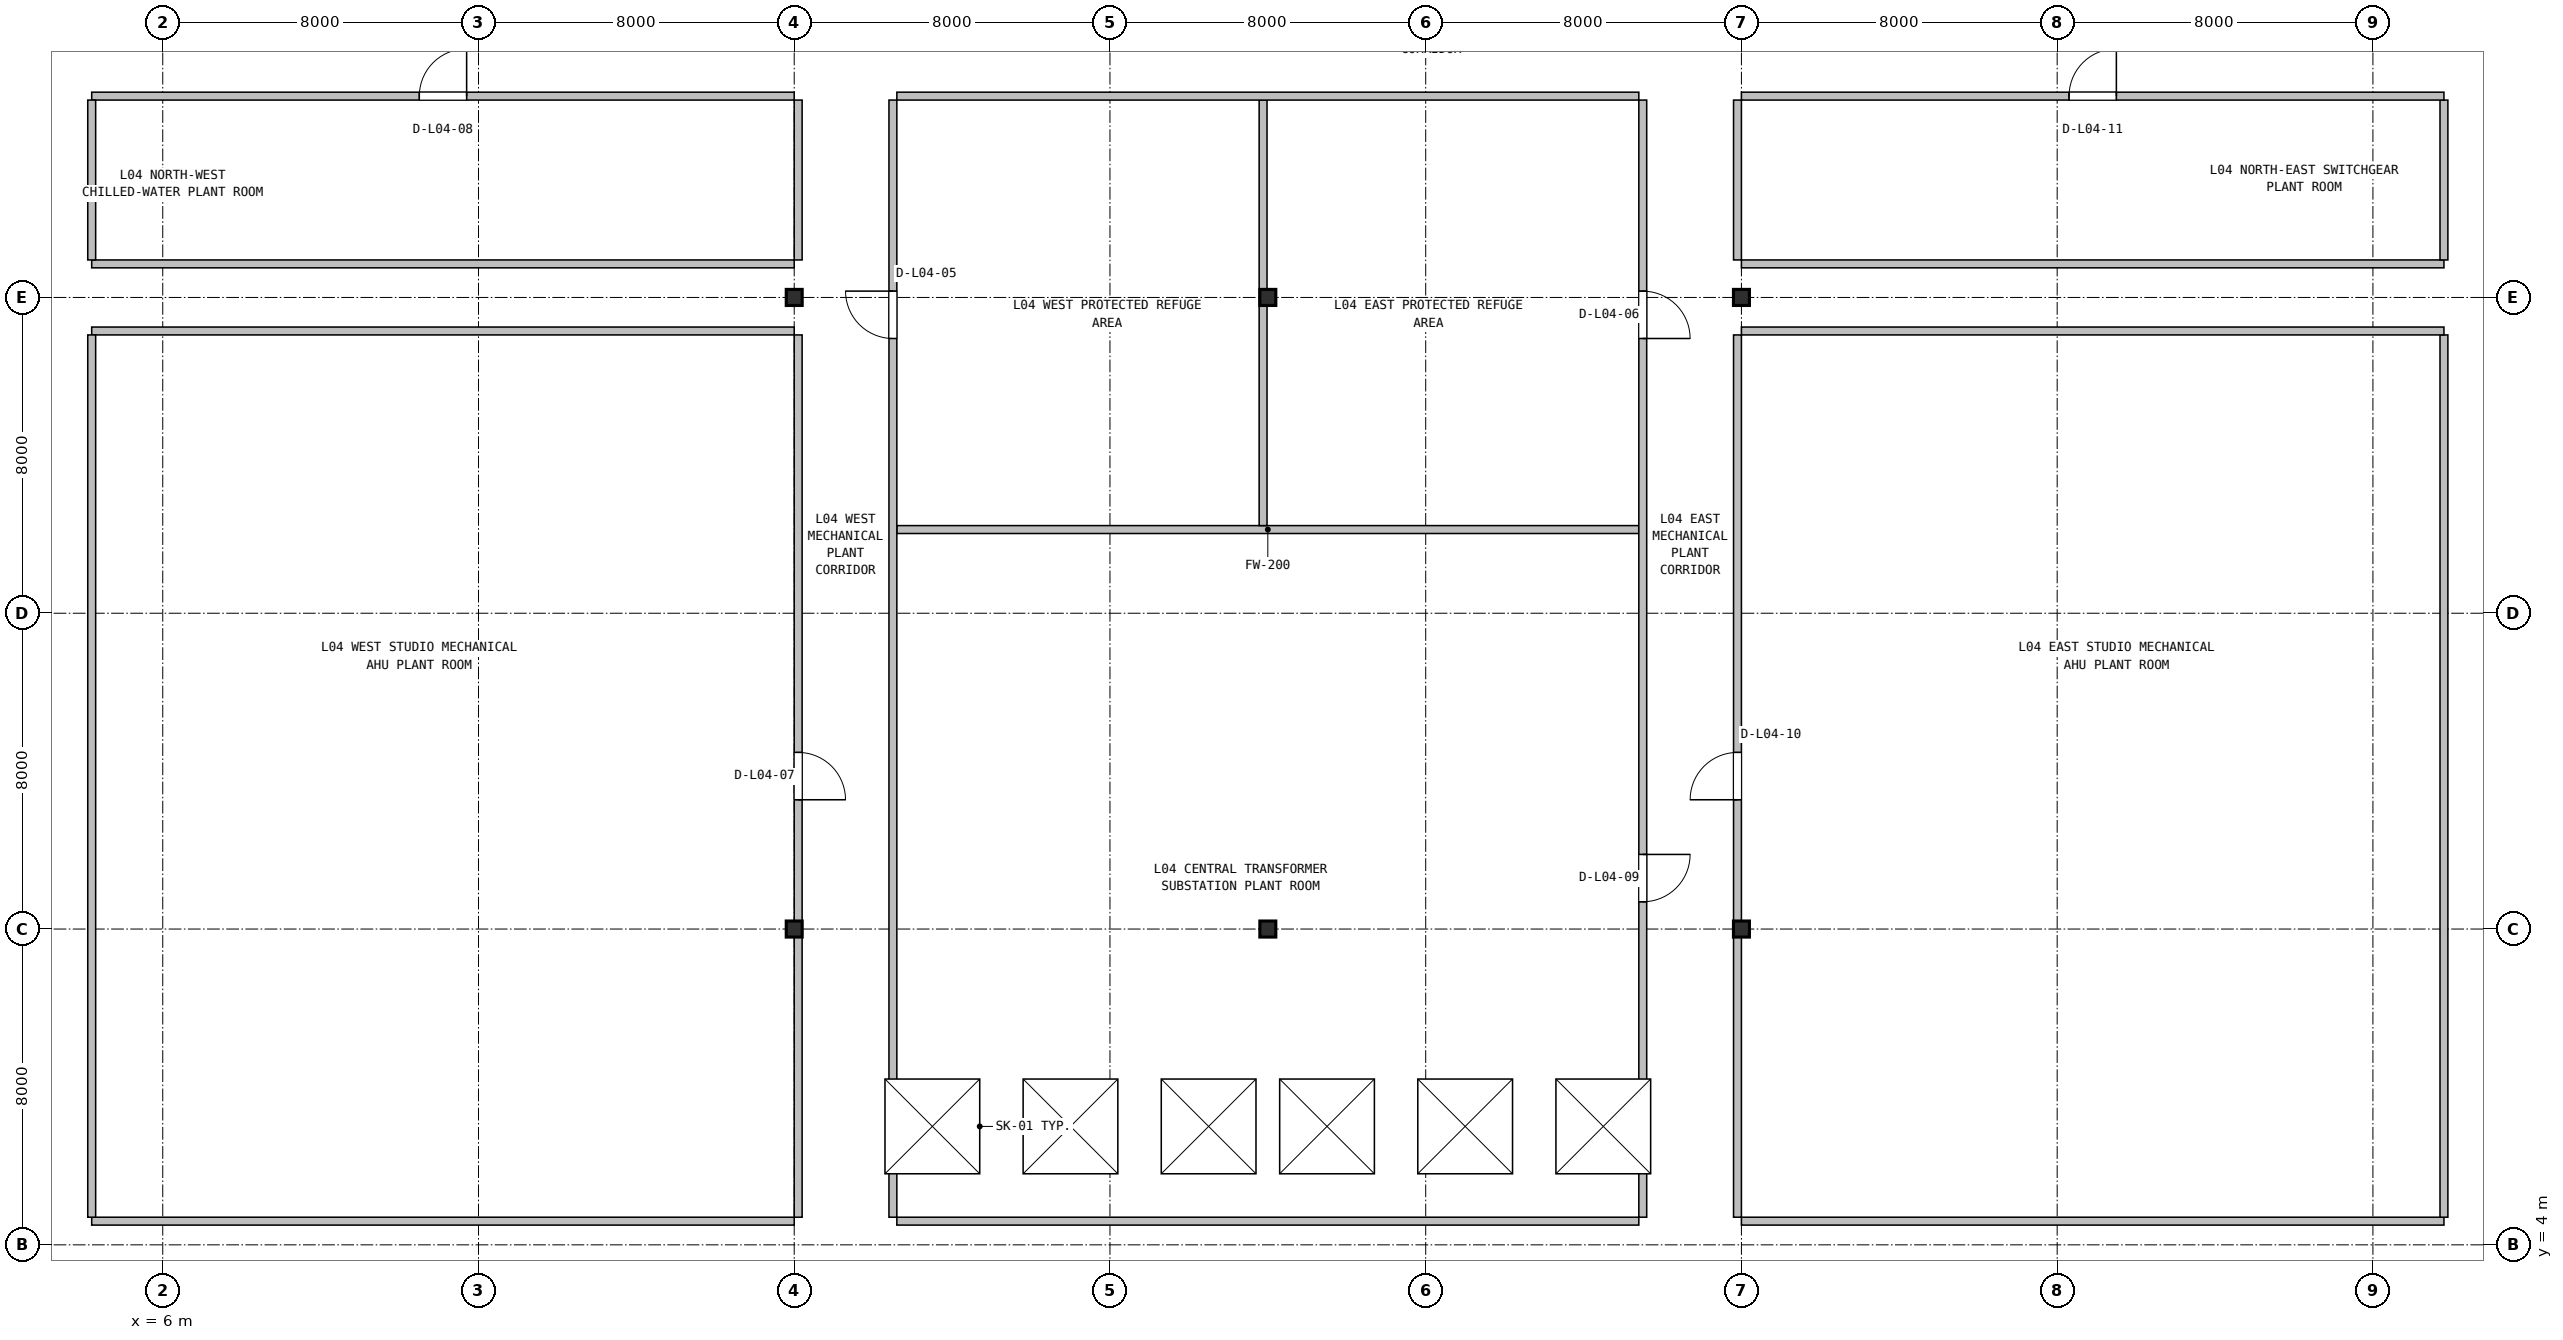
"""IFC4 building model, lengths in metres.
Left out: names, types, materials, properties, quantities, classifications, styles, units other than length and angle.
Written with IfcOpenShell. Run it as: python <this file> out.ifc"""

import sys

from ifc_helpers import new_model, si_unit, direction, frame, frame_2d, origin, origin_2d, place, context, subcontext, project, spatial, rectangle, i_section, extrude, source, transform, mapped, element, fill, save


model = new_model("IFC4")
c1 = context("Model", 3, precision=1e-05, world=origin(), true_north=direction((0.0, 1.0)))
c2 = subcontext(c1, "Body", "Model", "MODEL_VIEW")
j1 = project(units=[si_unit("LENGTHUNIT", "METRE"), si_unit("PLANEANGLEUNIT", "RADIAN")], contexts=[c1])
p1 = place(None, origin())
s1 = spatial("IfcSite", under=j1, at=p1, CompositionType="ELEMENT")
p2 = place(p1, origin())
s2 = spatial("IfcBuilding", under=s1, at=p2, CompositionType="ELEMENT")
p3 = place(p2, frame((0.0, 0.0, 22.2)))
s3 = spatial("IfcBuildingStorey", under=s2, at=p3, CompositionType="ELEMENT", Elevation=22.2)
m1 = source(origin(), c2, "Body", "SweptSolid", [
    extrude(i_section(OverallWidth=0.404, OverallDepth=0.407, WebThickness=0.027, FlangeThickness=0.044, FilletRadius=0.018, at=origin_2d()), origin(), (0.0, 0.0, 1.0), 5.4),
])
for number, where, z_axis, x_axis in (
    (1, (22.0, 12.0, 0.0), (0.0, 0.0, 1.0), (1.0, 0.0, 0.0)),
    (2, (34.0, 12.0, 0.0), (0.0, 0.0, 1.0), (1.0, 0.0, 0.0)),
    (3, (46.0, 12.0, 0.0), (0.0, 0.0, 1.0), (1.0, 0.0, 0.0)),
    (4, (22.0, 28.0, 0.0), (0.0, 0.0, 1.0), (1.0, 0.0, 0.0)),
    (5, (34.0, 28.0, 0.0), (0.0, 0.0, 1.0), (1.0, 0.0, 0.0)),
    (6, (46.0, 28.0, 0.0), (0.0, 0.0, 1.0), (1.0, 0.0, 0.0)),
):
    element("IfcColumn", number, at=place(p3, frame(where, z_axis=z_axis, x_axis=x_axis)), inside=s3, PredefinedType="COLUMN", context=c2, shape_type="MappedRepresentation", body=[
        mapped(m1, transform((0.0, 0.0, 0.0), x_axis=(1.0, 0.0, 0.0), y_axis=(0.0, 1.0, 0.0), z_axis=(0.0, 0.0, 1.0), scale=1.0)),
    ])
p4 = place(p3, frame((24.6, 22.12, 0.0), z_axis=(0.0, 0.0, 1.0), x_axis=(1.0, 0.0, 0.0)))
e7 = element("IfcWall", 7, at=p4, inside=s3, PredefinedType="SOLIDWALL", context=c2, shape_type="SweptSolid", body=[
    extrude(rectangle(XDim=18.8, YDim=0.2, at=frame_2d((9.4, 0.0))), origin(), (0.0, 0.0, 1.0), 3.725),
])
p5 = place(p3, frame((33.88, 22.22, 0.0), z_axis=(0.0, 0.0, 1.0), x_axis=(0.0, 1.0, 0.0)))
e8 = element("IfcWall", 8, at=p5, inside=s3, PredefinedType="SOLIDWALL", context=c2, shape_type="SweptSolid", body=[
    extrude(rectangle(XDim=10.78, YDim=0.2, at=frame_2d((5.39, 0.0))), origin(), (0.0, 0.0, 1.0), 3.725),
])
p6 = place(p3, frame((24.6, 33.1, 0.0), z_axis=(0.0, 0.0, 1.0), x_axis=(1.0, 0.0, 0.0)))
e9 = element("IfcWall", 9, at=p6, inside=s3, PredefinedType="SOLIDWALL", context=c2, shape_type="SweptSolid", body=[
    extrude(rectangle(XDim=18.8, YDim=0.2, at=frame_2d((9.4, 0.0))), origin(), (0.0, 0.0, 1.0), 3.855),
])
p7 = place(p3, frame((24.5, 4.7, 0.0), z_axis=(0.0, 0.0, 1.0), x_axis=(0.0, 1.0, 0.0)))
e10 = element("IfcWall", 10, at=p7, inside=s3, PredefinedType="SOLIDWALL", context=c2, shape_type="SweptSolid", body=[
    extrude(rectangle(XDim=28.3, YDim=0.2, at=frame_2d((14.15, 0.0))), origin(), (0.0, 0.0, 1.0), 3.725),
])
p8 = place(p7, frame((22.26, 0.0, 0.0)))
e11 = element("IfcOpeningElement", 11, at=p8, cuts=e10, PredefinedType="OPENING", context=c2, shape_type="SweptSolid", body=[
    extrude(rectangle(XDim=1.2, YDim=2.1, at=frame_2d((0.6, 1.05))), frame((0.0, 0.11, 0.0), z_axis=(0.0, -1.0, 0.0), x_axis=(1.0, 0.0, 0.0)), (0.0, 0.0, 1.0), 0.22),
])
p9 = place(p3, frame((43.5, 4.7, 0.0), z_axis=(0.0, 0.0, 1.0), x_axis=(0.0, 1.0, 0.0)))
e12 = element("IfcWall", 12, at=p9, inside=s3, PredefinedType="SOLIDWALL", context=c2, shape_type="SweptSolid", body=[
    extrude(rectangle(XDim=28.3, YDim=0.2, at=frame_2d((14.15, 0.0))), origin(), (0.0, 0.0, 1.0), 3.725),
])
p10 = place(p9, frame((22.26, 0.0, 0.0)))
e13 = element("IfcOpeningElement", 13, at=p10, cuts=e12, PredefinedType="OPENING", context=c2, shape_type="SweptSolid", body=[
    extrude(rectangle(XDim=1.2, YDim=2.1, at=frame_2d((0.6, 1.05))), frame((0.0, 0.11, 0.0), z_axis=(0.0, -1.0, 0.0), x_axis=(1.0, 0.0, 0.0)), (0.0, 0.0, 1.0), 0.22),
])
p11 = place(p9, frame((7.99, 0.0, 0.0)))
e14 = element("IfcOpeningElement", 14, at=p11, cuts=e12, PredefinedType="OPENING", context=c2, shape_type="SweptSolid", body=[
    extrude(rectangle(XDim=1.2, YDim=2.1, at=frame_2d((0.6, 1.05))), frame((0.0, 0.11, 0.0), z_axis=(0.0, -1.0, 0.0), x_axis=(1.0, 0.0, 0.0)), (0.0, 0.0, 1.0), 0.22),
])
p12 = place(p3, frame((4.2, 4.6, 0.0), z_axis=(0.0, 0.0, 1.0), x_axis=(1.0, 0.0, 0.0)))
e15 = element("IfcWall", 15, at=p12, inside=s3, PredefinedType="SOLIDWALL", context=c2, shape_type="SweptSolid", body=[
    extrude(rectangle(XDim=17.8, YDim=0.2, at=frame_2d((8.9, 0.0))), origin(), (0.0, 0.0, 1.0), 3.725),
])
p13 = place(p3, frame((22.1, 4.7, 0.0), z_axis=(0.0, 0.0, 1.0), x_axis=(0.0, 1.0, 0.0)))
e16 = element("IfcWall", 16, at=p13, inside=s3, PredefinedType="SOLIDWALL", context=c2, shape_type="SweptSolid", body=[
    extrude(rectangle(XDim=22.35, YDim=0.2, at=frame_2d((11.175, 0.0))), origin(), (0.0, 0.0, 1.0), 3.725),
])
p14 = place(p13, frame((10.575, 0.0, 0.0)))
e17 = element("IfcOpeningElement", 17, at=p14, cuts=e16, PredefinedType="OPENING", context=c2, shape_type="SweptSolid", body=[
    extrude(rectangle(XDim=1.2, YDim=2.1, at=frame_2d((0.6, 1.05))), frame((0.0, 0.11, 0.0), z_axis=(0.0, -1.0, 0.0), x_axis=(1.0, 0.0, 0.0)), (0.0, 0.0, 1.0), 0.22),
])
p15 = place(p3, frame((4.2, 27.15, 0.0), z_axis=(0.0, 0.0, 1.0), x_axis=(1.0, 0.0, 0.0)))
e18 = element("IfcWall", 18, at=p15, inside=s3, PredefinedType="SOLIDWALL", context=c2, shape_type="SweptSolid", body=[
    extrude(rectangle(XDim=17.8, YDim=0.2, at=frame_2d((8.9, 0.0))), origin(), (0.0, 0.0, 1.0), 3.725),
])
p16 = place(p3, frame((4.2, 4.7, 0.0), z_axis=(0.0, 0.0, 1.0), x_axis=(0.0, 1.0, 0.0)))
e19 = element("IfcWall", 19, at=p16, inside=s3, PredefinedType="SOLIDWALL", context=c2, shape_type="SweptSolid", body=[
    extrude(rectangle(XDim=22.35, YDim=0.2, at=frame_2d((11.175, 0.0))), origin(), (0.0, 0.0, 1.0), 3.725),
])
p17 = place(p3, frame((4.2, 28.85, 0.0), z_axis=(0.0, 0.0, 1.0), x_axis=(1.0, 0.0, 0.0)))
e20 = element("IfcWall", 20, at=p17, inside=s3, PredefinedType="SOLIDWALL", context=c2, shape_type="SweptSolid", body=[
    extrude(rectangle(XDim=17.8, YDim=0.2, at=frame_2d((8.9, 0.0))), origin(), (0.0, 0.0, 1.0), 5.06),
])
p18 = place(p3, frame((22.1, 28.95, 0.0), z_axis=(0.0, 0.0, 1.0), x_axis=(0.0, 1.0, 0.0)))
e21 = element("IfcWall", 21, at=p18, inside=s3, PredefinedType="SOLIDWALL", context=c2, shape_type="SweptSolid", body=[
    extrude(rectangle(XDim=4.05, YDim=0.2, at=frame_2d((2.025, 0.0))), origin(), (0.0, 0.0, 1.0), 3.855),
])
p19 = place(p3, frame((4.2, 33.1, 0.0), z_axis=(0.0, 0.0, 1.0), x_axis=(1.0, 0.0, 0.0)))
e22 = element("IfcWall", 22, at=p19, inside=s3, PredefinedType="SOLIDWALL", context=c2, shape_type="SweptSolid", body=[
    extrude(rectangle(XDim=17.8, YDim=0.2, at=frame_2d((8.9, 0.0))), origin(), (0.0, 0.0, 1.0), 5.06),
])
p20 = place(p19, frame((8.3, 0.0, 0.0)))
e23 = element("IfcOpeningElement", 23, at=p20, cuts=e22, PredefinedType="OPENING", context=c2, shape_type="SweptSolid", body=[
    extrude(rectangle(XDim=1.2, YDim=2.1, at=frame_2d((0.6, 1.05))), frame((0.0, 0.11, 0.0), z_axis=(0.0, -1.0, 0.0), x_axis=(1.0, 0.0, 0.0)), (0.0, 0.0, 1.0), 0.22),
])
p21 = place(p3, frame((4.2, 28.95, 0.0), z_axis=(0.0, 0.0, 1.0), x_axis=(0.0, 1.0, 0.0)))
e24 = element("IfcWall", 24, at=p21, inside=s3, PredefinedType="SOLIDWALL", context=c2, shape_type="SweptSolid", body=[
    extrude(rectangle(XDim=4.05, YDim=0.2, at=frame_2d((2.025, 0.0))), origin(), (0.0, 0.0, 1.0), 5.06),
])
p22 = place(p3, frame((24.6, 4.6, 0.0), z_axis=(0.0, 0.0, 1.0), x_axis=(1.0, 0.0, 0.0)))
e25 = element("IfcWall", 25, at=p22, inside=s3, PredefinedType="SOLIDWALL", context=c2, shape_type="SweptSolid", body=[
    extrude(rectangle(XDim=18.8, YDim=0.2, at=frame_2d((9.4, 0.0))), origin(), (0.0, 0.0, 1.0), 3.725),
])
p23 = place(p3, frame((46.0, 4.6, 0.0), z_axis=(0.0, 0.0, 1.0), x_axis=(1.0, 0.0, 0.0)))
e26 = element("IfcWall", 26, at=p23, inside=s3, PredefinedType="SOLIDWALL", context=c2, shape_type="SweptSolid", body=[
    extrude(rectangle(XDim=17.8, YDim=0.2, at=frame_2d((8.9, 0.0))), origin(), (0.0, 0.0, 1.0), 3.725),
])
p24 = place(p3, frame((63.8, 4.7, 0.0), z_axis=(0.0, 0.0, 1.0), x_axis=(0.0, 1.0, 0.0)))
e27 = element("IfcWall", 27, at=p24, inside=s3, PredefinedType="SOLIDWALL", context=c2, shape_type="SweptSolid", body=[
    extrude(rectangle(XDim=22.35, YDim=0.2, at=frame_2d((11.175, 0.0))), origin(), (0.0, 0.0, 1.0), 3.725),
])
p25 = place(p3, frame((46.0, 27.15, 0.0), z_axis=(0.0, 0.0, 1.0), x_axis=(1.0, 0.0, 0.0)))
e28 = element("IfcWall", 28, at=p25, inside=s3, PredefinedType="SOLIDWALL", context=c2, shape_type="SweptSolid", body=[
    extrude(rectangle(XDim=17.8, YDim=0.2, at=frame_2d((8.9, 0.0))), origin(), (0.0, 0.0, 1.0), 3.725),
])
p26 = place(p3, frame((45.9, 4.7, 0.0), z_axis=(0.0, 0.0, 1.0), x_axis=(0.0, 1.0, 0.0)))
e29 = element("IfcWall", 29, at=p26, inside=s3, PredefinedType="SOLIDWALL", context=c2, shape_type="SweptSolid", body=[
    extrude(rectangle(XDim=22.35, YDim=0.2, at=frame_2d((11.175, 0.0))), origin(), (0.0, 0.0, 1.0), 3.725),
])
p27 = place(p26, frame((10.575, 0.0, 0.0)))
e30 = element("IfcOpeningElement", 30, at=p27, cuts=e29, PredefinedType="OPENING", context=c2, shape_type="SweptSolid", body=[
    extrude(rectangle(XDim=1.2, YDim=2.1, at=frame_2d((0.6, 1.05))), frame((0.0, 0.11, 0.0), z_axis=(0.0, -1.0, 0.0), x_axis=(1.0, 0.0, 0.0)), (0.0, 0.0, 1.0), 0.22),
])
p28 = place(p3, frame((46.0, 28.85, 0.0), z_axis=(0.0, 0.0, 1.0), x_axis=(1.0, 0.0, 0.0)))
e31 = element("IfcWall", 31, at=p28, inside=s3, PredefinedType="SOLIDWALL", context=c2, shape_type="SweptSolid", body=[
    extrude(rectangle(XDim=17.8, YDim=0.2, at=frame_2d((8.9, 0.0))), origin(), (0.0, 0.0, 1.0), 5.06),
])
p29 = place(p3, frame((63.8, 28.95, 0.0), z_axis=(0.0, 0.0, 1.0), x_axis=(0.0, 1.0, 0.0)))
e32 = element("IfcWall", 32, at=p29, inside=s3, PredefinedType="SOLIDWALL", context=c2, shape_type="SweptSolid", body=[
    extrude(rectangle(XDim=4.05, YDim=0.2, at=frame_2d((2.025, 0.0))), origin(), (0.0, 0.0, 1.0), 5.06),
])
p30 = place(p3, frame((46.0, 33.1, 0.0), z_axis=(0.0, 0.0, 1.0), x_axis=(1.0, 0.0, 0.0)))
e33 = element("IfcWall", 33, at=p30, inside=s3, PredefinedType="SOLIDWALL", context=c2, shape_type="SweptSolid", body=[
    extrude(rectangle(XDim=17.8, YDim=0.2, at=frame_2d((8.9, 0.0))), origin(), (0.0, 0.0, 1.0), 5.06),
])
p31 = place(p30, frame((8.3, 0.0, 0.0)))
e34 = element("IfcOpeningElement", 34, at=p31, cuts=e33, PredefinedType="OPENING", context=c2, shape_type="SweptSolid", body=[
    extrude(rectangle(XDim=1.2, YDim=2.1, at=frame_2d((0.6, 1.05))), frame((0.0, 0.11, 0.0), z_axis=(0.0, -1.0, 0.0), x_axis=(1.0, 0.0, 0.0)), (0.0, 0.0, 1.0), 0.22),
])
p32 = place(p3, frame((45.9, 28.95, 0.0), z_axis=(0.0, 0.0, 1.0), x_axis=(0.0, 1.0, 0.0)))
e35 = element("IfcWall", 35, at=p32, inside=s3, PredefinedType="SOLIDWALL", context=c2, shape_type="SweptSolid", body=[
    extrude(rectangle(XDim=4.05, YDim=0.2, at=frame_2d((2.025, 0.0))), origin(), (0.0, 0.0, 1.0), 3.855),
])
p33 = place(p3, frame((0.0, 0.0, -0.32)))
p34 = place(p33, frame((25.5, 7.0, 0.0)))
p35 = place(p34, frame((0.0, 0.0, 0.27)))
e36 = element("IfcWindow", 36, at=p35, inside=s3, PartitioningType="SINGLE_PANEL", PredefinedType="SKYLIGHT", context=c2, shape_type="SweptSolid", body=[
    extrude(rectangle(XDim=2.4, YDim=2.4, at=origin_2d()), origin(), (0.0, 0.0, 1.0), 0.05),
])
p36 = place(p33, frame((29.0, 7.0, 0.0)))
p37 = place(p36, frame((0.0, 0.0, 0.27)))
e37 = element("IfcWindow", 37, at=p37, inside=s3, PartitioningType="SINGLE_PANEL", PredefinedType="SKYLIGHT", context=c2, shape_type="SweptSolid", body=[
    extrude(rectangle(XDim=2.4, YDim=2.4, at=origin_2d()), origin(), (0.0, 0.0, 1.0), 0.05),
])
p38 = place(p33, frame((32.5, 7.0, 0.0)))
p39 = place(p38, frame((0.0, 0.0, 0.27)))
e38 = element("IfcWindow", 38, at=p39, inside=s3, PartitioningType="SINGLE_PANEL", PredefinedType="SKYLIGHT", context=c2, shape_type="SweptSolid", body=[
    extrude(rectangle(XDim=2.4, YDim=2.4, at=origin_2d()), origin(), (0.0, 0.0, 1.0), 0.05),
])
p40 = place(p33, frame((35.5, 7.0, 0.0)))
p41 = place(p40, frame((0.0, 0.0, 0.27)))
e39 = element("IfcWindow", 39, at=p41, inside=s3, PartitioningType="SINGLE_PANEL", PredefinedType="SKYLIGHT", context=c2, shape_type="SweptSolid", body=[
    extrude(rectangle(XDim=2.4, YDim=2.4, at=origin_2d()), origin(), (0.0, 0.0, 1.0), 0.05),
])
p42 = place(p33, frame((39.0, 7.0, 0.0)))
p43 = place(p42, frame((0.0, 0.0, 0.27)))
e40 = element("IfcWindow", 40, at=p43, inside=s3, PartitioningType="SINGLE_PANEL", PredefinedType="SKYLIGHT", context=c2, shape_type="SweptSolid", body=[
    extrude(rectangle(XDim=2.4, YDim=2.4, at=origin_2d()), origin(), (0.0, 0.0, 1.0), 0.05),
])
p44 = place(p33, frame((42.5, 7.0, 0.0)))
p45 = place(p44, frame((0.0, 0.0, 0.27)))
e41 = element("IfcWindow", 41, at=p45, inside=s3, PartitioningType="SINGLE_PANEL", PredefinedType="SKYLIGHT", context=c2, shape_type="SweptSolid", body=[
    extrude(rectangle(XDim=2.4, YDim=2.4, at=origin_2d()), origin(), (0.0, 0.0, 1.0), 0.05),
])
m2 = source(origin(), c2, "Body", "SweptSolid", [
    extrude(rectangle(XDim=1.2, YDim=2.1, at=frame_2d((0.6, 1.05))), frame((0.0, 0.025, 0.0), z_axis=(0.0, -1.0, 0.0), x_axis=(1.0, 0.0, 0.0)), (0.0, 0.0, 1.0), 0.05),
])
p46 = place(p8, origin())
e42 = element("IfcDoor", 42, at=p46, inside=s3, OperationType="SINGLE_SWING_RIGHT", PredefinedType="DOOR", context=c2, shape_type="MappedRepresentation", body=[
    mapped(m2, transform((0.0, 0.0, 0.0), x_axis=(1.0, 0.0, 0.0), y_axis=(0.0, 1.0, 0.0), z_axis=(0.0, 0.0, 1.0), scale=1.0)),
])
fill(e11, e42)
p47 = place(p10, frame((1.2, 0.0, 0.0), z_axis=(0.0, 0.0, 1.0), x_axis=(-1.0, 0.0, 0.0)))
e43 = element("IfcDoor", 43, at=p47, inside=s3, OperationType="SINGLE_SWING_LEFT", PredefinedType="DOOR", context=c2, shape_type="MappedRepresentation", body=[
    mapped(m2, transform((0.0, 0.0, 0.0), x_axis=(1.0, 0.0, 0.0), y_axis=(0.0, 1.0, 0.0), z_axis=(0.0, 0.0, 1.0), scale=1.0)),
])
fill(e13, e43)
p48 = place(p11, frame((1.2, 0.0, 0.0), z_axis=(0.0, 0.0, 1.0), x_axis=(-1.0, 0.0, 0.0)))
e44 = element("IfcDoor", 44, at=p48, inside=s3, OperationType="SINGLE_SWING_RIGHT", PredefinedType="DOOR", context=c2, shape_type="MappedRepresentation", body=[
    mapped(m2, transform((0.0, 0.0, 0.0), x_axis=(1.0, 0.0, 0.0), y_axis=(0.0, 1.0, 0.0), z_axis=(0.0, 0.0, 1.0), scale=1.0)),
])
fill(e14, e44)
p49 = place(p14, frame((1.2, 0.0, 0.0), z_axis=(0.0, 0.0, 1.0), x_axis=(-1.0, 0.0, 0.0)))
e45 = element("IfcDoor", 45, at=p49, inside=s3, OperationType="SINGLE_SWING_LEFT", PredefinedType="DOOR", context=c2, shape_type="MappedRepresentation", body=[
    mapped(m2, transform((0.0, 0.0, 0.0), x_axis=(1.0, 0.0, 0.0), y_axis=(0.0, 1.0, 0.0), z_axis=(0.0, 0.0, 1.0), scale=1.0)),
])
fill(e17, e45)
p50 = place(p20, origin())
e46 = element("IfcDoor", 46, at=p50, inside=s3, OperationType="SINGLE_SWING_RIGHT", PredefinedType="DOOR", context=c2, shape_type="MappedRepresentation", body=[
    mapped(m2, transform((0.0, 0.0, 0.0), x_axis=(1.0, 0.0, 0.0), y_axis=(0.0, 1.0, 0.0), z_axis=(0.0, 0.0, 1.0), scale=1.0)),
])
fill(e23, e46)
p51 = place(p27, origin())
e47 = element("IfcDoor", 47, at=p51, inside=s3, OperationType="SINGLE_SWING_LEFT", PredefinedType="DOOR", context=c2, shape_type="MappedRepresentation", body=[
    mapped(m2, transform((0.0, 0.0, 0.0), x_axis=(1.0, 0.0, 0.0), y_axis=(0.0, 1.0, 0.0), z_axis=(0.0, 0.0, 1.0), scale=1.0)),
])
fill(e30, e47)
p52 = place(p31, origin())
e48 = element("IfcDoor", 48, at=p52, inside=s3, OperationType="SINGLE_SWING_RIGHT", PredefinedType="DOOR", context=c2, shape_type="MappedRepresentation", body=[
    mapped(m2, transform((0.0, 0.0, 0.0), x_axis=(1.0, 0.0, 0.0), y_axis=(0.0, 1.0, 0.0), z_axis=(0.0, 0.0, 1.0), scale=1.0)),
])
fill(e34, e48)
save(model, sys.argv[1])
